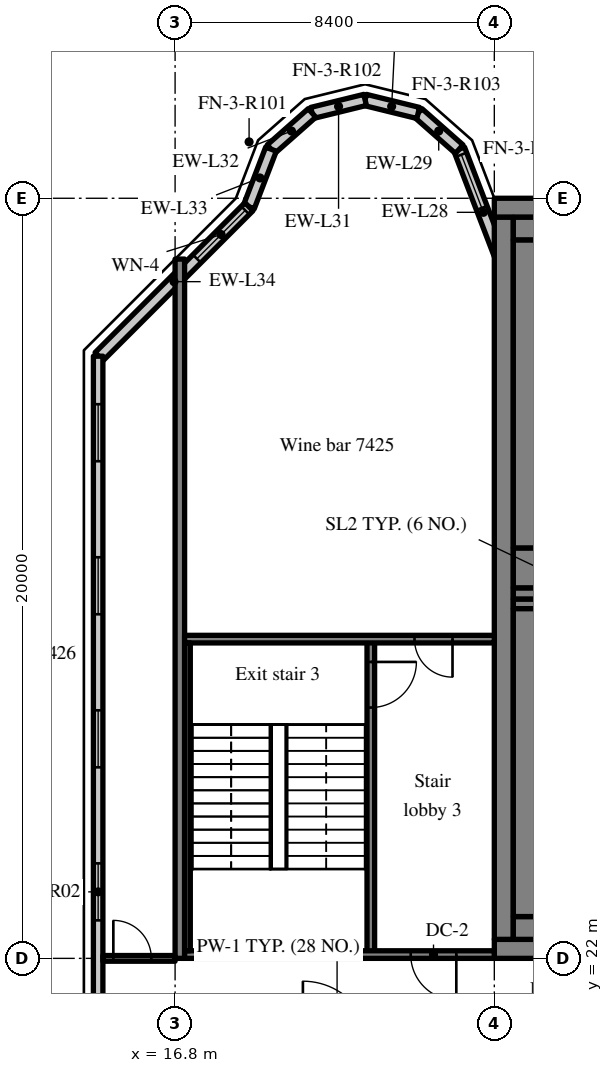
"""IFC4 building model, lengths in metres.
Left out: names, types, materials, properties, quantities, classifications, styles, units other than length and angle.
Written with IfcOpenShell. Run it as: python <this file> out.ifc"""

import sys

from ifc_helpers import new_model, si_unit, direction, frame, frame_2d, origin, place, context, subcontext, project, spatial, rectangle, extrude, source, transform, mapped, element, fill, save


model = new_model("IFC4")
c1 = context("Model", 3, precision=1e-05, world=origin(), true_north=direction((0.0, 1.0)))
c2 = subcontext(c1, "Body", "Model", "MODEL_VIEW")
j1 = project(units=[si_unit("LENGTHUNIT", "METRE"), si_unit("PLANEANGLEUNIT", "RADIAN")], contexts=[c1])
p1 = place(None, origin())
s1 = spatial("IfcSite", under=j1, at=p1, CompositionType="ELEMENT")
p2 = place(p1, origin())
s2 = spatial("IfcBuilding", under=s1, at=p2, CompositionType="ELEMENT")
p3 = place(p2, frame((0.0, 0.0, 309.7)))
s3 = spatial("IfcBuildingStorey", under=s2, at=p3, CompositionType="ELEMENT", Elevation=309.7)
m1 = source(origin(), c2, "Body", "SweptSolid", [
    extrude(rectangle(XDim=50.4, YDim=0.5, at=frame_2d((25.2, 0.0))), origin(), (0.0, 0.0, 1.0), 3.72),
])
p4 = place(p3, frame((25.2, 22.25, 0.0), z_axis=(0.0, 0.0, 1.0), x_axis=(1.0, 0.0, 0.0)))
e1 = element("IfcWall", 1, at=p4, inside=s3, PredefinedType="SHEAR", context=c2, shape_type="MappedRepresentation", body=[
    mapped(m1, transform((0.0, 0.0, 0.0), scale=1.0)),
])
m2 = source(origin(), c2, "Body", "SweptSolid", [
    extrude(rectangle(XDim=1.8, YDim=2.1, at=frame_2d((0.9, 1.05))), frame((0.0, 0.26, 0.0), z_axis=(0.0, -1.0, 0.0), x_axis=(1.0, 0.0, 0.0)), (0.0, 0.0, 1.0), 0.52),
])
p5 = place(p4, frame((15.9, 0.0, 0.0)))
e2 = element("IfcOpeningElement", 2, at=p5, cuts=e1, PredefinedType="OPENING", context=c2, shape_type="MappedRepresentation", body=[
    mapped(m2, transform((0.0, 0.0, 0.0), scale=1.0)),
])
m3 = source(origin(), c2, "Body", "SweptSolid", [
    extrude(rectangle(XDim=0.9, YDim=2.1, at=frame_2d((0.45, 1.05))), frame((0.0, 0.26, 0.0), z_axis=(0.0, -1.0, 0.0), x_axis=(1.0, 0.0, 0.0)), (0.0, 0.0, 1.0), 0.52),
])
p6 = place(p4, frame((11.175, 0.0, 0.0)))
e3 = element("IfcOpeningElement", 3, at=p6, cuts=e1, PredefinedType="OPENING", context=c2, shape_type="MappedRepresentation", body=[
    mapped(m3, transform((0.0, 0.0, 0.0), scale=1.0)),
])
p7 = place(p4, frame((21.525, 0.0, 0.0)))
e4 = element("IfcOpeningElement", 4, at=p7, cuts=e1, PredefinedType="OPENING", context=c2, shape_type="MappedRepresentation", body=[
    mapped(m3, transform((0.0, 0.0, 0.0), scale=1.0)),
])
p8 = place(p4, frame((32.7, 0.0, 0.0)))
e5 = element("IfcOpeningElement", 5, at=p8, cuts=e1, PredefinedType="OPENING", context=c2, shape_type="MappedRepresentation", body=[
    mapped(m2, transform((0.0, 0.0, 0.0), scale=1.0)),
])
m4 = source(origin(), c2, "Body", "SweptSolid", [
    extrude(rectangle(XDim=1.2, YDim=2.1, at=frame_2d((0.6, 1.05))), frame((0.0, 0.26, 0.0), z_axis=(0.0, -1.0, 0.0), x_axis=(1.0, 0.0, 0.0)), (0.0, 0.0, 1.0), 0.52),
])
p9 = place(p4, frame((6.5, 0.0, 0.0)))
e6 = element("IfcOpeningElement", 6, at=p9, cuts=e1, PredefinedType="OPENING", context=c2, shape_type="MappedRepresentation", body=[
    mapped(m4, transform((0.0, 0.0, 0.0), scale=1.0)),
])
p10 = place(p4, frame((47.975, 0.0, 0.0)))
e7 = element("IfcOpeningElement", 7, at=p10, cuts=e1, PredefinedType="OPENING", context=c2, shape_type="MappedRepresentation", body=[
    mapped(m4, transform((0.0, 0.0, 0.0), scale=1.0)),
])
p11 = place(p3, frame((25.2, 41.75, 0.0), z_axis=(0.0, 0.0, 1.0), x_axis=(1.0, 0.0, 0.0)))
e8 = element("IfcWall", 8, at=p11, inside=s3, PredefinedType="SHEAR", context=c2, shape_type="MappedRepresentation", body=[
    mapped(m1, transform((0.0, 0.0, 0.0), scale=1.0)),
])
m5 = source(origin(), c2, "Body", "SweptSolid", [
    extrude(rectangle(XDim=19.0, YDim=0.5, at=frame_2d((9.5, 0.0))), origin(), (0.0, 0.0, 1.0), 3.72),
])
p12 = place(p3, frame((25.45, 22.5, 0.0), z_axis=(0.0, 0.0, 1.0), x_axis=(0.0, 1.0, 0.0)))
e9 = element("IfcWall", 9, at=p12, inside=s3, PredefinedType="SHEAR", context=c2, shape_type="MappedRepresentation", body=[
    mapped(m5, transform((0.0, 0.0, 0.0), scale=1.0)),
])
m6 = source(origin(), c2, "Body", "SweptSolid", [
    extrude(rectangle(XDim=7.75, YDim=0.3, at=frame_2d((3.875, 0.0))), origin(), (0.0, 0.0, 1.0), 3.72),
])
p13 = place(p3, frame((25.7, 31.6, 0.0), z_axis=(0.0, 0.0, 1.0), x_axis=(1.0, 0.0, 0.0)))
e10 = element("IfcWall", 10, at=p13, inside=s3, PredefinedType="SHEAR", context=c2, shape_type="MappedRepresentation", body=[
    mapped(m6, transform((0.0, 0.0, 0.0), scale=1.0)),
])
m7 = source(origin(), c2, "Body", "SweptSolid", [
    extrude(rectangle(XDim=1.1, YDim=2.1, at=frame_2d((0.55, 1.05))), frame((0.0, 0.16, 0.0), z_axis=(0.0, -1.0, 0.0), x_axis=(1.0, 0.0, 0.0)), (0.0, 0.0, 1.0), 0.32),
])
p14 = place(p13, frame((6.05, 0.0, 0.0)))
e11 = element("IfcOpeningElement", 11, at=p14, cuts=e10, PredefinedType="OPENING", context=c2, shape_type="MappedRepresentation", body=[
    mapped(m7, transform((0.0, 0.0, 0.0), scale=1.0)),
])
m8 = source(origin(), c2, "Body", "SweptSolid", [
    extrude(rectangle(XDim=18.4, YDim=0.25, at=frame_2d((9.2, 0.0))), origin(), (0.0, 0.0, 1.0), 3.72),
])
p15 = place(p3, frame((16.925, 22.0, 0.0), z_axis=(0.0, 0.0, 1.0), x_axis=(0.0, 1.0, 0.0)))
e12 = element("IfcWall", 12, at=p15, inside=s3, PredefinedType="SHEAR", context=c2, shape_type="MappedRepresentation", body=[
    mapped(m8, transform((0.0, 0.0, 0.0), scale=1.0)),
])
m9 = source(origin(), c2, "Body", "SweptSolid", [
    extrude(rectangle(XDim=3.559, YDim=0.3, at=frame_2d((1.78, 0.0))), origin(), (0.0, 0.0, 1.0), 3.72),
])
p16 = place(p3, frame((25.55, 39.969, 0.0), z_axis=(0.0, 0.0, 1.0), x_axis=(-0.35779745313, 0.933799219604, 0.0)))
e13 = element("IfcWall", 13, at=p16, inside=s3, PredefinedType="SOLIDWALL", context=c2, shape_type="MappedRepresentation", body=[
    mapped(m9, transform((0.0, 0.0, 0.0), scale=1.0)),
])
m10 = source(origin(), c2, "Body", "SweptSolid", [
    extrude(rectangle(XDim=1.5, YDim=2.0, at=frame_2d((0.75, 1.0))), frame((0.0, 0.16, 0.0), z_axis=(0.0, -1.0, 0.0), x_axis=(1.0, 0.0, 0.0)), (0.0, 0.0, 1.0), 0.32),
])
p17 = place(p16, frame((1.903, 0.0, 0.9)))
e14 = element("IfcOpeningElement", 14, at=p17, cuts=e13, PredefinedType="OPENING", context=c2, shape_type="MappedRepresentation", body=[
    mapped(m10, transform((0.0, 0.0, 0.0), scale=1.0)),
])
m11 = source(origin(), c2, "Body", "SweptSolid", [
    extrude(rectangle(XDim=1.44, YDim=0.3, at=frame_2d((0.72, 0.0))), origin(), (0.0, 0.0, 1.0), 3.72),
])
p18 = place(p3, frame((24.277, 43.292, 0.0), z_axis=(0.0, 0.0, 1.0), x_axis=(-0.749649827867, 0.661834673902, 0.0)))
e15 = element("IfcWall", 15, at=p18, inside=s3, PredefinedType="SOLIDWALL", context=c2, shape_type="MappedRepresentation", body=[
    mapped(m11, transform((0.0, 0.0, 0.0), scale=1.0)),
])
m12 = source(origin(), c2, "Body", "SweptSolid", [
    extrude(rectangle(XDim=1.438, YDim=0.3, at=frame_2d((0.719, 0.0))), origin(), (0.0, 0.0, 1.0), 3.72),
])
p19 = place(p3, frame((23.197, 44.245, 0.0), z_axis=(0.0, 0.0, 1.0), x_axis=(-0.971152283879, 0.238460146601, 0.0)))
e16 = element("IfcWall", 16, at=p19, inside=s3, PredefinedType="SOLIDWALL", context=c2, shape_type="MappedRepresentation", body=[
    mapped(m12, transform((0.0, 0.0, 0.0), scale=1.0)),
])
m13 = source(origin(), c2, "Body", "SweptSolid", [
    extrude(rectangle(XDim=1.439, YDim=0.3, at=frame_2d((0.719, 0.0))), origin(), (0.0, 0.0, 1.0), 3.72),
])
p20 = place(p3, frame((21.8, 44.588, 0.0), z_axis=(0.0, 0.0, 1.0), x_axis=(-0.971161932466, -0.238420848351, 0.0)))
e17 = element("IfcWall", 17, at=p20, inside=s3, PredefinedType="SOLIDWALL", context=c2, shape_type="MappedRepresentation", body=[
    mapped(m13, transform((0.0, 0.0, 0.0), scale=1.0)),
])
m14 = source(origin(), c2, "Body", "SweptSolid", [
    extrude(rectangle(XDim=1.44, YDim=0.3, at=frame_2d((0.72, 0.0))), origin(), (0.0, 0.0, 1.0), 3.72),
])
p21 = place(p3, frame((20.403, 44.245, 0.0), z_axis=(0.0, 0.0, 1.0), x_axis=(-0.74957555648, -0.661918790432, 0.0)))
e18 = element("IfcWall", 18, at=p21, inside=s3, PredefinedType="SOLIDWALL", context=c2, shape_type="MappedRepresentation", body=[
    mapped(m14, transform((0.0, 0.0, 0.0), scale=1.0)),
])
m15 = source(origin(), c2, "Body", "SweptSolid", [
    extrude(rectangle(XDim=1.622, YDim=0.3, at=frame_2d((0.811, 0.0))), origin(), (0.0, 0.0, 1.0), 3.72),
])
p22 = place(p3, frame((19.323, 43.292, 0.0), z_axis=(0.0, 0.0, 1.0), x_axis=(-0.357778527068, -0.933806471154, 0.0)))
e19 = element("IfcWall", 19, at=p22, inside=s3, PredefinedType="SOLIDWALL", context=c2, shape_type="MappedRepresentation", body=[
    mapped(m15, transform((0.0, 0.0, 0.0), scale=1.0)),
])
m16 = source(origin(), c2, "Body", "SweptSolid", [
    extrude(rectangle(XDim=5.576, YDim=0.3, at=frame_2d((2.788, 0.0))), origin(), (0.0, 0.0, 1.0), 3.72),
])
p23 = place(p3, frame((18.743, 41.777, 0.0), z_axis=(0.0, 0.0, 1.0), x_axis=(-0.707106781187, -0.707106781187, 0.0)))
e20 = element("IfcWall", 20, at=p23, inside=s3, PredefinedType="SOLIDWALL", context=c2, shape_type="MappedRepresentation", body=[
    mapped(m16, transform((0.0, 0.0, 0.0), scale=1.0)),
])
m17 = source(origin(), c2, "Body", "SweptSolid", [
    extrude(rectangle(XDim=1.8, YDim=1.5, at=frame_2d((0.9, 0.75))), frame((0.0, 0.16, 0.0), z_axis=(0.0, -1.0, 0.0), x_axis=(1.0, 0.0, 0.0)), (0.0, 0.0, 1.0), 0.32),
])
p24 = place(p23, frame((0.135, 0.0, 0.9)))
e21 = element("IfcOpeningElement", 21, at=p24, cuts=e20, PredefinedType="OPENING", context=c2, shape_type="MappedRepresentation", body=[
    mapped(m17, transform((0.0, 0.0, 0.0), scale=1.0)),
])
m18 = source(origin(), c2, "Body", "SweptSolid", [
    extrude(rectangle(XDim=28.189, YDim=0.25, at=frame_2d((14.095, 0.0))), origin(), (0.0, 0.0, 1.0), 3.72),
])
p25 = place(p3, frame((14.775, 37.845, 0.0), z_axis=(0.0, 0.0, 1.0), x_axis=(0.0, -1.0, 0.0)))
e22 = element("IfcWall", 22, at=p25, inside=s3, PredefinedType="SOLIDWALL", context=c2, shape_type="MappedRepresentation", body=[
    mapped(m18, transform((0.0, 0.0, 0.0), scale=1.0)),
])
m19 = source(origin(), c2, "Body", "SweptSolid", [
    extrude(rectangle(XDim=1.5, YDim=1.5, at=frame_2d((0.75, 0.75))), frame((0.0, 0.135, 0.0), z_axis=(0.0, -1.0, 0.0), x_axis=(1.0, 0.0, 0.0)), (0.0, 0.0, 1.0), 0.27),
])
p26 = place(p25, frame((1.263, 0.0, 0.9)))
e23 = element("IfcOpeningElement", 23, at=p26, cuts=e22, PredefinedType="OPENING", context=c2, shape_type="MappedRepresentation", body=[
    mapped(m19, transform((0.0, 0.0, 0.0), scale=1.0)),
])
p27 = place(p25, frame((5.291, 0.0, 0.9)))
e24 = element("IfcOpeningElement", 24, at=p27, cuts=e22, PredefinedType="OPENING", context=c2, shape_type="MappedRepresentation", body=[
    mapped(m19, transform((0.0, 0.0, 0.0), scale=1.0)),
])
p28 = place(p25, frame((9.318, 0.0, 0.9)))
e25 = element("IfcOpeningElement", 25, at=p28, cuts=e22, PredefinedType="OPENING", context=c2, shape_type="MappedRepresentation", body=[
    mapped(m19, transform((0.0, 0.0, 0.0), scale=1.0)),
])
p29 = place(p25, frame((13.345, 0.0, 0.9)))
e26 = element("IfcOpeningElement", 26, at=p29, cuts=e22, PredefinedType="OPENING", context=c2, shape_type="MappedRepresentation", body=[
    mapped(m19, transform((0.0, 0.0, 0.0), scale=1.0)),
])
p30 = place(p25, frame((17.372, 0.0, 0.9)))
e27 = element("IfcOpeningElement", 27, at=p30, cuts=e22, PredefinedType="OPENING", context=c2, shape_type="MappedRepresentation", body=[
    mapped(m19, transform((0.0, 0.0, 0.0), scale=1.0)),
])
p31 = place(p25, frame((21.399, 0.0, 0.9)))
e28 = element("IfcOpeningElement", 28, at=p31, cuts=e22, PredefinedType="OPENING", context=c2, shape_type="MappedRepresentation", body=[
    mapped(m19, transform((0.0, 0.0, 0.0), scale=1.0)),
])
p32 = place(p25, frame((25.426, 0.0, 0.9)))
e29 = element("IfcOpeningElement", 29, at=p32, cuts=e22, PredefinedType="OPENING", context=c2, shape_type="MappedRepresentation", body=[
    mapped(m19, transform((0.0, 0.0, 0.0), scale=1.0)),
])
m20 = source(origin(), c2, "Body", "SweptSolid", [
    extrude(rectangle(XDim=8.3, YDim=0.2, at=frame_2d((4.15, 0.0))), origin(), (0.0, 0.0, 1.0), 3.72),
])
p33 = place(p3, frame((21.95, 22.1, 0.0), z_axis=(0.0, 0.0, 1.0), x_axis=(0.0, 1.0, 0.0)))
e30 = element("IfcWall", 30, at=p33, inside=s3, PredefinedType="SOLIDWALL", context=c2, shape_type="MappedRepresentation", body=[
    mapped(m20, transform((0.0, 0.0, 0.0), scale=1.0)),
])
m21 = source(origin(), c2, "Body", "SweptSolid", [
    extrude(rectangle(XDim=1.2, YDim=2.1, at=frame_2d((0.6, 1.05))), frame((0.0, 0.11, 0.0), z_axis=(0.0, -1.0, 0.0), x_axis=(1.0, 0.0, 0.0)), (0.0, 0.0, 1.0), 0.22),
])
p34 = place(p33, frame((6.5, 0.0, 0.0)))
e31 = element("IfcOpeningElement", 31, at=p34, cuts=e30, PredefinedType="OPENING", context=c2, shape_type="MappedRepresentation", body=[
    mapped(m21, transform((0.0, 0.0, 0.0), scale=1.0)),
])
m22 = source(origin(), c2, "Body", "SweptSolid", [
    extrude(rectangle(XDim=8.15, YDim=0.2, at=frame_2d((4.075, 0.0))), origin(), (0.0, 0.0, 1.0), 3.72),
])
p35 = place(p3, frame((17.05, 22.1, 0.0), z_axis=(0.0, 0.0, 1.0), x_axis=(1.0, 0.0, 0.0)))
e32 = element("IfcWall", 32, at=p35, inside=s3, PredefinedType="SOLIDWALL", context=c2, shape_type="MappedRepresentation", body=[
    mapped(m22, transform((0.0, 0.0, 0.0), scale=1.0)),
])
p36 = place(p35, frame((5.95, 0.0, 0.0)))
e33 = element("IfcOpeningElement", 33, at=p36, cuts=e32, PredefinedType="OPENING", context=c2, shape_type="MappedRepresentation", body=[
    mapped(m21, transform((0.0, 0.0, 0.0), scale=1.0)),
])
p37 = place(p3, frame((17.05, 30.4, 0.0), z_axis=(0.0, 0.0, 1.0), x_axis=(1.0, 0.0, 0.0)))
e34 = element("IfcWall", 34, at=p37, inside=s3, PredefinedType="SOLIDWALL", context=c2, shape_type="MappedRepresentation", body=[
    mapped(m22, transform((0.0, 0.0, 0.0), scale=1.0)),
])
m23 = source(origin(), c2, "Body", "SweptSolid", [
    extrude(rectangle(XDim=1.0, YDim=2.1, at=frame_2d((0.5, 1.05))), frame((0.0, 0.11, 0.0), z_axis=(0.0, -1.0, 0.0), x_axis=(1.0, 0.0, 0.0)), (0.0, 0.0, 1.0), 0.22),
])
p38 = place(p37, frame((6.05, 0.0, 0.0)))
e35 = element("IfcOpeningElement", 35, at=p38, cuts=e34, PredefinedType="OPENING", context=c2, shape_type="MappedRepresentation", body=[
    mapped(m23, transform((0.0, 0.0, 0.0), scale=1.0)),
])
m24 = source(origin(), c2, "Body", "SweptSolid", [
    extrude(rectangle(XDim=5.25, YDim=0.6, at=frame_2d((2.625, 0.0))), origin(), (0.0, 0.0, 1.0), 3.72),
])
p39 = place(p3, frame((25.7, 22.8, 0.0), z_axis=(0.0, 0.0, 1.0), x_axis=(1.0, 0.0, 0.0)))
e36 = element("IfcWall", 36, at=p39, inside=s3, PredefinedType="SOLIDWALL", context=c2, shape_type="MappedRepresentation", body=[
    mapped(m24, transform((0.0, 0.0, 0.0), scale=1.0)),
])
m25 = source(origin(), c2, "Body", "SweptSolid", [
    extrude(rectangle(XDim=5.25, YDim=0.25, at=frame_2d((2.625, 0.0))), origin(), (0.0, 0.0, 1.0), 3.72),
])
p40 = place(p3, frame((25.7, 31.325, 0.0), z_axis=(0.0, 0.0, 1.0), x_axis=(1.0, 0.0, 0.0)))
e37 = element("IfcWall", 37, at=p40, inside=s3, PredefinedType="SOLIDWALL", context=c2, shape_type="MappedRepresentation", body=[
    mapped(m25, transform((0.0, 0.0, 0.0), scale=1.0)),
])
m26 = source(origin(), c2, "Body", "SweptSolid", [
    extrude(rectangle(XDim=8.1, YDim=0.6, at=frame_2d((4.05, 0.0))), origin(), (0.0, 0.0, 1.0), 3.72),
])
p41 = place(p3, frame((26.0, 23.1, 0.0), z_axis=(0.0, 0.0, 1.0), x_axis=(0.0, 1.0, 0.0)))
e38 = element("IfcWall", 38, at=p41, inside=s3, PredefinedType="SOLIDWALL", context=c2, shape_type="MappedRepresentation", body=[
    mapped(m26, transform((0.0, 0.0, 0.0), scale=1.0)),
])
m27 = source(origin(), c2, "Body", "SweptSolid", [
    extrude(rectangle(XDim=8.1, YDim=0.15, at=frame_2d((4.05, 0.0))), origin(), (0.0, 0.0, 1.0), 3.72),
])
p42 = place(p3, frame((17.125, 22.2, 0.0), z_axis=(0.0, 0.0, 1.0), x_axis=(0.0, 1.0, 0.0)))
e39 = element("IfcWall", 39, at=p42, inside=s3, PredefinedType="SOLIDWALL", context=c2, shape_type="MappedRepresentation", body=[
    mapped(m27, transform((0.0, 0.0, 0.0), scale=1.0)),
])
p43 = place(p3, frame((25.7, 41.2, 0.0), z_axis=(0.0, 0.0, 1.0), x_axis=(1.0, 0.0, 0.0)))
e40 = element("IfcWall", 40, at=p43, inside=s3, PredefinedType="SOLIDWALL", context=c2, shape_type="MappedRepresentation", body=[
    mapped(m24, transform((0.0, 0.0, 0.0), scale=1.0)),
])
m28 = source(origin(), c2, "Body", "SweptSolid", [
    extrude(rectangle(XDim=5.25, YDim=1.05, at=frame_2d((2.625, 0.0))), origin(), (0.0, 0.0, 1.0), 3.72),
])
p44 = place(p3, frame((25.7, 32.275, 0.0), z_axis=(0.0, 0.0, 1.0), x_axis=(1.0, 0.0, 0.0)))
e41 = element("IfcWall", 41, at=p44, inside=s3, PredefinedType="SOLIDWALL", context=c2, shape_type="MappedRepresentation", body=[
    mapped(m28, transform((0.0, 0.0, 0.0), scale=1.0)),
])
p45 = place(p3, frame((26.0, 32.8, 0.0), z_axis=(0.0, 0.0, 1.0), x_axis=(0.0, 1.0, 0.0)))
e42 = element("IfcWall", 42, at=p45, inside=s3, PredefinedType="SOLIDWALL", context=c2, shape_type="MappedRepresentation", body=[
    mapped(m26, transform((0.0, 0.0, 0.0), scale=1.0)),
])
m29 = source(origin(), c2, "Body", "SweptSolid", [
    extrude(rectangle(XDim=1.9, YDim=0.15, at=frame_2d((0.95, 0.0))), origin(), (0.0, 0.0, 1.0), 3.02),
])
p46 = place(p3, frame((14.9, 22.0, 0.0), z_axis=(0.0, 0.0, 1.0), x_axis=(1.0, 0.0, 0.0)))
e43 = element("IfcWall", 43, at=p46, inside=s3, PredefinedType="PARTITIONING", context=c2, shape_type="MappedRepresentation", body=[
    mapped(m29, transform((0.0, 0.0, 0.0), scale=1.0)),
])
m30 = source(origin(), c2, "Body", "SweptSolid", [
    extrude(rectangle(XDim=1.0, YDim=2.1, at=frame_2d((0.5, 1.05))), frame((0.0, 0.085, 0.0), z_axis=(0.0, -1.0, 0.0), x_axis=(1.0, 0.0, 0.0)), (0.0, 0.0, 1.0), 0.17),
])
p47 = place(p46, frame((0.275, 0.0, 0.0)))
e44 = element("IfcOpeningElement", 44, at=p47, cuts=e43, PredefinedType="OPENING", context=c2, shape_type="MappedRepresentation", body=[
    mapped(m30, transform((0.0, 0.0, 0.0), scale=1.0)),
])
m31 = source(origin(), c2, "Body", "SweptSolid", [
    extrude(rectangle(XDim=1.5, YDim=2.0, at=frame_2d((0.75, 1.0))), frame((0.0, 0.03, 0.0), z_axis=(0.0, -1.0, 0.0), x_axis=(1.0, 0.0, 0.0)), (0.0, 0.0, 1.0), 0.06),
])
p48 = place(p17, origin())
e45 = element("IfcWindow", 45, at=p48, inside=s3, PartitioningType="SINGLE_PANEL", PredefinedType="WINDOW", context=c2, shape_type="MappedRepresentation", body=[
    mapped(m31, transform((0.0, 0.0, 0.0), scale=1.0)),
])
fill(e14, e45)
m32 = source(origin(), c2, "Body", "SweptSolid", [
    extrude(rectangle(XDim=1.8, YDim=1.5, at=frame_2d((0.9, 0.75))), frame((0.0, 0.03, 0.0), z_axis=(0.0, -1.0, 0.0), x_axis=(1.0, 0.0, 0.0)), (0.0, 0.0, 1.0), 0.06),
])
p49 = place(p24, origin())
e46 = element("IfcWindow", 46, at=p49, inside=s3, PartitioningType="SINGLE_PANEL", PredefinedType="WINDOW", context=c2, shape_type="MappedRepresentation", body=[
    mapped(m32, transform((0.0, 0.0, 0.0), scale=1.0)),
])
fill(e21, e46)
m33 = source(origin(), c2, "Body", "SweptSolid", [
    extrude(rectangle(XDim=1.5, YDim=1.5, at=frame_2d((0.75, 0.75))), frame((0.0, 0.03, 0.0), z_axis=(0.0, -1.0, 0.0), x_axis=(1.0, 0.0, 0.0)), (0.0, 0.0, 1.0), 0.06),
])
p50 = place(p26, origin())
e47 = element("IfcWindow", 47, at=p50, inside=s3, PartitioningType="SINGLE_PANEL", PredefinedType="WINDOW", context=c2, shape_type="MappedRepresentation", body=[
    mapped(m33, transform((0.0, 0.0, 0.0), scale=1.0)),
])
fill(e23, e47)
p51 = place(p27, origin())
e48 = element("IfcWindow", 48, at=p51, inside=s3, PartitioningType="SINGLE_PANEL", PredefinedType="WINDOW", context=c2, shape_type="MappedRepresentation", body=[
    mapped(m33, transform((0.0, 0.0, 0.0), scale=1.0)),
])
fill(e24, e48)
p52 = place(p28, origin())
e49 = element("IfcWindow", 49, at=p52, inside=s3, PartitioningType="SINGLE_PANEL", PredefinedType="WINDOW", context=c2, shape_type="MappedRepresentation", body=[
    mapped(m33, transform((0.0, 0.0, 0.0), scale=1.0)),
])
fill(e25, e49)
p53 = place(p29, origin())
e50 = element("IfcWindow", 50, at=p53, inside=s3, PartitioningType="SINGLE_PANEL", PredefinedType="WINDOW", context=c2, shape_type="MappedRepresentation", body=[
    mapped(m33, transform((0.0, 0.0, 0.0), scale=1.0)),
])
fill(e26, e50)
m34 = source(origin(), c2, "Body", "SweptSolid", [
    extrude(rectangle(XDim=1.2, YDim=2.1, at=frame_2d((0.6, 1.05))), frame((0.0, 0.025, 0.0), z_axis=(0.0, -1.0, 0.0), x_axis=(1.0, 0.0, 0.0)), (0.0, 0.0, 1.0), 0.05),
])
p54 = place(p34, origin())
e51 = element("IfcDoor", 51, at=p54, inside=s3, OperationType="SINGLE_SWING_RIGHT", PredefinedType="DOOR", context=c2, shape_type="MappedRepresentation", body=[
    mapped(m34, transform((0.0, 0.0, 0.0), scale=1.0)),
])
fill(e31, e51)
p55 = place(p36, origin())
e52 = element("IfcDoor", 52, at=p55, inside=s3, OperationType="SINGLE_SWING_RIGHT", PredefinedType="DOOR", context=c2, shape_type="MappedRepresentation", body=[
    mapped(m34, transform((0.0, 0.0, 0.0), scale=1.0)),
])
fill(e33, e52)
m35 = source(origin(), c2, "Body", "SweptSolid", [
    extrude(rectangle(XDim=1.0, YDim=2.1, at=frame_2d((0.5, 1.05))), frame((0.0, 0.025, 0.0), z_axis=(0.0, -1.0, 0.0), x_axis=(1.0, 0.0, 0.0)), (0.0, 0.0, 1.0), 0.05),
])
p56 = place(p38, origin())
e53 = element("IfcDoor", 53, at=p56, inside=s3, OperationType="SINGLE_SWING_RIGHT", PredefinedType="DOOR", context=c2, shape_type="MappedRepresentation", body=[
    mapped(m35, transform((0.0, 0.0, 0.0), scale=1.0)),
])
fill(e35, e53)
p57 = place(p47, origin())
e54 = element("IfcDoor", 54, at=p57, inside=s3, OperationType="SINGLE_SWING_LEFT", PredefinedType="DOOR", context=c2, shape_type="MappedRepresentation", body=[
    mapped(m35, transform((0.0, 0.0, 0.0), scale=1.0)),
])
fill(e44, e54)
save(model, sys.argv[1])
